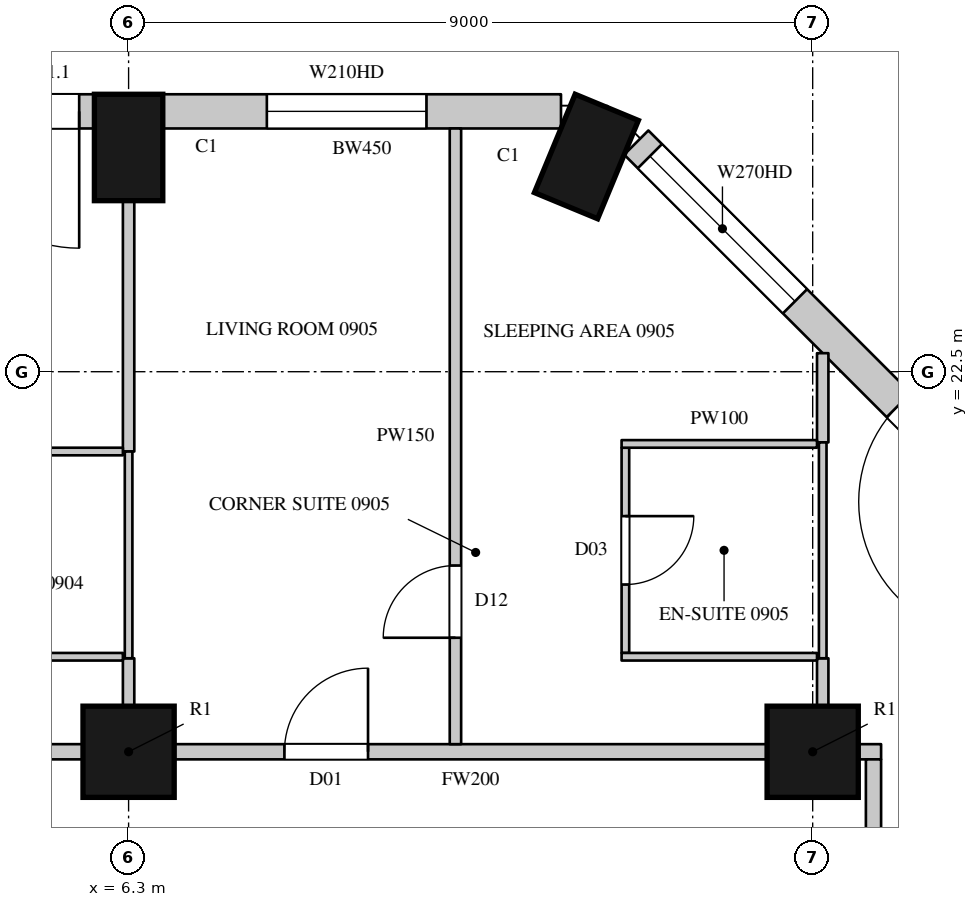
"""IFC4 building model, lengths in metres.
Left out: names, types, materials, properties, quantities, classifications, styles, units other than length and angle.
Written with IfcOpenShell. Run it as: python <this file> out.ifc"""

import sys

from ifc_helpers import new_model, si_unit, direction, frame, frame_2d, origin, origin_2d, place, context, subcontext, project, spatial, rectangle, circle, extrude, element, fill, save


model = new_model("IFC4")
c1 = context("Model", 3, precision=1e-05, world=origin(), true_north=direction((0.0, 1.0)))
c2 = subcontext(c1, "Body", "Model", "MODEL_VIEW")
j1 = project(units=[si_unit("LENGTHUNIT", "METRE"), si_unit("PLANEANGLEUNIT", "RADIAN")], contexts=[c1])
p1 = place(None, origin())
s1 = spatial("IfcSite", under=j1, at=p1, CompositionType="ELEMENT")
p2 = place(p1, origin())
s2 = spatial("IfcBuilding", under=s1, at=p2, CompositionType="ELEMENT")
p3 = place(p2, frame((0.0, 0.0, 62.7)))
s3 = spatial("IfcBuildingStorey", under=s2, at=p3, CompositionType="ELEMENT", Elevation=62.7)
for number, where, z_axis, x_axis in (
    (1, (12.323, 25.331, 0.0), (0.0, 0.0, 1.0), (-0.924, 0.383, 0.0)),
    (2, (6.3, 25.45, 0.0), (0.0, 0.0, 1.0), (-1.0, 0.0, 0.0)),
):
    element("IfcColumn", number, at=place(p3, frame(where, z_axis=z_axis, x_axis=x_axis)), inside=s3, PredefinedType="COLUMN", context=c2, shape_type="SweptSolid", body=[
        extrude(rectangle(XDim=0.9, YDim=1.4, at=origin_2d()), origin(), (0.0, 0.0, 1.0), 3.6),
    ])
for number, where, z_axis, x_axis in (
    (3, (6.3, 17.5, 0.0), (0.0, 0.0, 1.0), (1.0, 0.0, 0.0)),
    (4, (15.3, 17.5, 0.0), (0.0, 0.0, 1.0), (1.0, 0.0, 0.0)),
):
    element("IfcColumn", number, at=place(p3, frame(where, z_axis=z_axis, x_axis=x_axis)), inside=s3, PredefinedType="COLUMN", context=c2, shape_type="SweptSolid", body=[
        extrude(circle(Radius=0.6, at=origin_2d()), origin(), (0.0, 0.0, 1.0), 3.6),
    ])
p4 = place(p3, frame((18.229, 20.265, 0.0), z_axis=(0.0, 0.0, 1.0), x_axis=(-0.707106781187, 0.707106781187, 0.0)))
e5 = element("IfcWall", 5, at=p4, inside=s3, PredefinedType="SOLIDWALL", context=c2, shape_type="SweptSolid", body=[
    extrude(rectangle(XDim=7.424, YDim=0.45, at=frame_2d((3.712, 0.0))), origin(), (0.0, 0.0, 1.0), 3.3),
])
p5 = place(p4, frame((0.74, 0.0, 0.0)))
e6 = element("IfcOpeningElement", 6, at=p5, cuts=e5, PredefinedType="OPENING", context=c2, shape_type="SweptSolid", body=[
    extrude(rectangle(XDim=1.8, YDim=2.4, at=frame_2d((0.9, 1.2))), frame((0.0, 0.235, 0.0), z_axis=(0.0, -1.0, 0.0), x_axis=(1.0, 0.0, 0.0)), (0.0, 0.0, 1.0), 0.47),
])
p6 = place(p4, frame((4.471, 0.0, 1.05)))
e7 = element("IfcOpeningElement", 7, at=p6, cuts=e5, PredefinedType="OPENING", context=c2, shape_type="SweptSolid", body=[
    extrude(rectangle(XDim=2.7, YDim=2.0, at=frame_2d((1.35, 1.0))), frame((0.0, 0.235, 0.0), z_axis=(0.0, -1.0, 0.0), x_axis=(1.0, 0.0, 0.0)), (0.0, 0.0, 1.0), 0.47),
])
p7 = place(p3, frame((11.989, 25.925, 0.0), z_axis=(0.0, 0.0, 1.0), x_axis=(-1.0, 0.0, 0.0)))
e8 = element("IfcWall", 8, at=p7, inside=s3, PredefinedType="SOLIDWALL", context=c2, shape_type="SweptSolid", body=[
    extrude(rectangle(XDim=5.239, YDim=0.45, at=frame_2d((2.619, 0.0))), origin(), (0.0, 0.0, 1.0), 3.3),
])
p8 = place(p7, frame((1.77, 0.0, 1.05)))
e9 = element("IfcOpeningElement", 9, at=p8, cuts=e8, PredefinedType="OPENING", context=c2, shape_type="SweptSolid", body=[
    extrude(rectangle(XDim=2.1, YDim=2.0, at=frame_2d((1.05, 1.0))), frame((0.0, 0.235, 0.0), z_axis=(0.0, -1.0, 0.0), x_axis=(1.0, 0.0, 0.0)), (0.0, 0.0, 1.0), 0.47),
])
p9 = place(p3, frame((5.85, 25.925, 0.0), z_axis=(0.0, 0.0, 1.0), x_axis=(-1.0, 0.0, 0.0)))
e10 = element("IfcWall", 10, at=p9, inside=s3, PredefinedType="SOLIDWALL", context=c2, shape_type="SweptSolid", body=[
    extrude(rectangle(XDim=8.1, YDim=0.45, at=frame_2d((4.05, 0.0))), origin(), (0.0, 0.0, 1.0), 3.3),
])
p10 = place(p9, frame((0.2, 0.0, 0.0)))
e11 = element("IfcOpeningElement", 11, at=p10, cuts=e10, PredefinedType="OPENING", context=c2, shape_type="SweptSolid", body=[
    extrude(rectangle(XDim=1.8, YDim=2.4, at=frame_2d((0.9, 1.2))), frame((0.0, 0.235, 0.0), z_axis=(0.0, -1.0, 0.0), x_axis=(1.0, 0.0, 0.0)), (0.0, 0.0, 1.0), 0.47),
])
p11 = place(p9, frame((2.2, 0.0, 1.05)))
e12 = element("IfcOpeningElement", 12, at=p11, cuts=e10, PredefinedType="OPENING", context=c2, shape_type="SweptSolid", body=[
    extrude(rectangle(XDim=1.2, YDim=2.0, at=frame_2d((0.6, 1.0))), frame((0.0, 0.235, 0.0), z_axis=(0.0, -1.0, 0.0), x_axis=(1.0, 0.0, 0.0)), (0.0, 0.0, 1.0), 0.47),
])
p12 = place(p9, frame((4.7, 0.0, 0.0)))
e13 = element("IfcOpeningElement", 13, at=p12, cuts=e10, PredefinedType="OPENING", context=c2, shape_type="SweptSolid", body=[
    extrude(rectangle(XDim=1.8, YDim=2.4, at=frame_2d((0.9, 1.2))), frame((0.0, 0.235, 0.0), z_axis=(0.0, -1.0, 0.0), x_axis=(1.0, 0.0, 0.0)), (0.0, 0.0, 1.0), 0.47),
])
p13 = place(p9, frame((6.7, 0.0, 1.05)))
e14 = element("IfcOpeningElement", 14, at=p13, cuts=e10, PredefinedType="OPENING", context=c2, shape_type="SweptSolid", body=[
    extrude(rectangle(XDim=1.2, YDim=2.0, at=frame_2d((0.6, 1.0))), frame((0.0, 0.235, 0.0), z_axis=(0.0, -1.0, 0.0), x_axis=(1.0, 0.0, 0.0)), (0.0, 0.0, 1.0), 0.47),
])
p14 = place(p3, frame((16.486, 23.529, 0.0), z_axis=(0.0, 0.0, 1.0), x_axis=(-0.707022305137, 0.707191247145, 0.0)))
e15 = element("IfcWall", 15, at=p14, inside=s3, PredefinedType="SOLIDWALL", context=c2, shape_type="SweptSolid", body=[
    extrude(rectangle(XDim=1.445, YDim=0.45, at=frame_2d((0.723, 0.0))), origin(), (0.0, 0.0, 1.0), 0.6),
])
p15 = place(p3, frame((-2.1, 17.5, 0.0), z_axis=(0.0, 0.0, 1.0), x_axis=(1.0, 0.0, 0.0)))
e16 = element("IfcWall", 16, at=p15, inside=s3, PredefinedType="PARTITIONING", context=c2, shape_type="SweptSolid", body=[
    extrude(rectangle(XDim=7.8, YDim=0.2, at=frame_2d((3.9, 0.0))), origin(), (0.0, 0.0, 1.0), 2.75),
])
p16 = place(p15, frame((4.2, 0.0, 0.0)))
e17 = element("IfcOpeningElement", 17, at=p16, cuts=e16, PredefinedType="OPENING", context=c2, shape_type="SweptSolid", body=[
    extrude(rectangle(XDim=0.95, YDim=2.2, at=frame_2d((0.475, 1.1))), frame((0.0, 0.11, 0.0), z_axis=(0.0, -1.0, 0.0), x_axis=(1.0, 0.0, 0.0)), (0.0, 0.0, 1.0), 0.22),
])
p17 = place(p3, frame((6.9, 17.5, 0.0), z_axis=(0.0, 0.0, 1.0), x_axis=(1.0, 0.0, 0.0)))
e18 = element("IfcWall", 18, at=p17, inside=s3, PredefinedType="PARTITIONING", context=c2, shape_type="SweptSolid", body=[
    extrude(rectangle(XDim=7.8, YDim=0.2, at=frame_2d((3.9, 0.0))), origin(), (0.0, 0.0, 1.0), 2.75),
])
p18 = place(p17, frame((1.45, 0.0, 0.0)))
e19 = element("IfcOpeningElement", 19, at=p18, cuts=e18, PredefinedType="OPENING", context=c2, shape_type="SweptSolid", body=[
    extrude(rectangle(XDim=1.1, YDim=2.4, at=frame_2d((0.55, 1.2))), frame((0.0, 0.11, 0.0), z_axis=(0.0, -1.0, 0.0), x_axis=(1.0, 0.0, 0.0)), (0.0, 0.0, 1.0), 0.22),
])
p19 = place(p3, frame((15.9, 17.5, 0.0), z_axis=(0.0, 0.0, 1.0), x_axis=(1.0, 0.0, 0.0)))
e20 = element("IfcWall", 20, at=p19, inside=s3, PredefinedType="PARTITIONING", context=c2, shape_type="SweptSolid", body=[
    extrude(rectangle(XDim=0.3, YDim=0.2, at=frame_2d((0.15, 0.0))), origin(), (0.0, 0.0, 1.0), 3.3),
])
p20 = place(p3, frame((16.1, 4.75, 0.0), z_axis=(0.0, 0.0, 1.0), x_axis=(0.0, 1.0, 0.0)))
e21 = element("IfcWall", 21, at=p20, inside=s3, PredefinedType="PARTITIONING", context=c2, shape_type="SweptSolid", body=[
    extrude(rectangle(XDim=12.65, YDim=0.2, at=frame_2d((6.325, 0.0))), origin(), (0.0, 0.0, 1.0), 3.3),
])
p21 = place(p20, frame((0.25, 0.0, 0.0)))
e22 = element("IfcOpeningElement", 22, at=p21, cuts=e21, PredefinedType="OPENING", context=c2, shape_type="SweptSolid", body=[
    extrude(rectangle(XDim=0.95, YDim=2.2, at=frame_2d((0.475, 1.1))), frame((0.0, 0.11, 0.0), z_axis=(0.0, -1.0, 0.0), x_axis=(1.0, 0.0, 0.0)), (0.0, 0.0, 1.0), 0.22),
])
p22 = place(p20, frame((6.9, 0.0, 0.0)))
e23 = element("IfcOpeningElement", 23, at=p22, cuts=e21, PredefinedType="OPENING", context=c2, shape_type="SweptSolid", body=[
    extrude(rectangle(XDim=0.95, YDim=2.2, at=frame_2d((0.475, 1.1))), frame((0.0, 0.11, 0.0), z_axis=(0.0, -1.0, 0.0), x_axis=(1.0, 0.0, 0.0)), (0.0, 0.0, 1.0), 0.22),
])
p23 = place(p3, frame((6.3, 18.1, 0.0), z_axis=(0.0, 0.0, 1.0), x_axis=(0.0, 1.0, 0.0)))
e24 = element("IfcWall", 24, at=p23, inside=s3, PredefinedType="PARTITIONING", context=c2, shape_type="SweptSolid", body=[
    extrude(rectangle(XDim=0.63, YDim=0.15, at=frame_2d((0.315, 0.0))), origin(), (0.0, 0.0, 1.0), 2.75),
])
p24 = place(p3, frame((6.3, 21.45, 0.0), z_axis=(0.0, 0.0, 1.0), x_axis=(0.0, 1.0, 0.0)))
e25 = element("IfcWall", 25, at=p24, inside=s3, PredefinedType="PARTITIONING", context=c2, shape_type="SweptSolid", body=[
    extrude(rectangle(XDim=3.3, YDim=0.15, at=frame_2d((1.65, 0.0))), origin(), (0.0, 0.0, 1.0), 2.75),
])
p25 = place(p3, frame((10.6, 17.6, 0.0), z_axis=(0.0, 0.0, 1.0), x_axis=(0.0, 1.0, 0.0)))
e26 = element("IfcWall", 26, at=p25, inside=s3, PredefinedType="PARTITIONING", context=c2, shape_type="SweptSolid", body=[
    extrude(rectangle(XDim=8.1, YDim=0.15, at=frame_2d((4.05, 0.0))), origin(), (0.0, 0.0, 1.0), 3.3),
])
p26 = place(p25, frame((1.4, 0.0, 0.0)))
e27 = element("IfcOpeningElement", 27, at=p26, cuts=e26, PredefinedType="OPENING", context=c2, shape_type="SweptSolid", body=[
    extrude(rectangle(XDim=0.95, YDim=2.2, at=frame_2d((0.475, 1.1))), frame((0.0, 0.085, 0.0), z_axis=(0.0, -1.0, 0.0), x_axis=(1.0, 0.0, 0.0)), (0.0, 0.0, 1.0), 0.17),
])
p27 = place(p3, frame((15.432, 18.094, 0.0), z_axis=(0.0, 0.0, 1.0), x_axis=(0.0, 1.0, 0.0)))
e28 = element("IfcWall", 28, at=p27, inside=s3, PredefinedType="PARTITIONING", context=c2, shape_type="SweptSolid", body=[
    extrude(rectangle(XDim=0.636, YDim=0.15, at=frame_2d((0.318, 0.0))), origin(), (0.0, 0.0, 1.0), 3.3),
])
p28 = place(p3, frame((15.432, 21.57, 0.0), z_axis=(0.0, 0.0, 1.0), x_axis=(0.0, 1.0, 0.0)))
e29 = element("IfcWall", 29, at=p28, inside=s3, PredefinedType="PARTITIONING", context=c2, shape_type="SweptSolid", body=[
    extrude(rectangle(XDim=1.174, YDim=0.15, at=frame_2d((0.587, 0.0))), origin(), (0.0, 0.0, 1.0), 3.3),
])
for number, where, z_axis, x_axis in (
    (30, (3.354, 18.75, 0.0), (0.0, 0.0, 1.0), (1.0, 0.0, 0.0)),
    (31, (3.354, 21.45, 0.0), (0.0, 0.0, 1.0), (1.0, 0.0, 0.0)),
):
    element("IfcWall", number, at=place(p3, frame(where, z_axis=z_axis, x_axis=x_axis)), inside=s3, PredefinedType="PARTITIONING", context=c2, shape_type="SweptSolid", body=[
        extrude(rectangle(XDim=2.871, YDim=0.1, at=frame_2d((1.436, 0.0))), origin(), (0.0, 0.0, 1.0), 3.3),
    ])
p29 = place(p3, frame((6.3, 18.73, 0.0), z_axis=(0.0, 0.0, 1.0), x_axis=(0.0, 1.0, 0.0)))
e32 = element("IfcWall", 32, at=p29, inside=s3, PredefinedType="PARTITIONING", context=c2, shape_type="SweptSolid", body=[
    extrude(rectangle(XDim=2.72, YDim=0.1, at=frame_2d((1.36, 0.0))), origin(), (0.0, 0.0, 1.0), 2.75),
])
p30 = place(p3, frame((12.836, 18.8, 0.0), z_axis=(0.0, 0.0, 1.0), x_axis=(0.0, 1.0, 0.0)))
e33 = element("IfcWall", 33, at=p30, inside=s3, PredefinedType="PARTITIONING", context=c2, shape_type="SweptSolid", body=[
    extrude(rectangle(XDim=2.7, YDim=0.1, at=frame_2d((1.35, 0.0))), origin(), (0.0, 0.0, 1.0), 3.3),
])
p31 = place(p30, frame((0.9, 0.0, 0.0)))
e34 = element("IfcOpeningElement", 34, at=p31, cuts=e33, PredefinedType="OPENING", context=c2, shape_type="SweptSolid", body=[
    extrude(rectangle(XDim=0.9, YDim=2.2, at=frame_2d((0.45, 1.1))), frame((0.0, 0.06, 0.0), z_axis=(0.0, -1.0, 0.0), x_axis=(1.0, 0.0, 0.0)), (0.0, 0.0, 1.0), 0.12),
])
for number, where, z_axis, x_axis in (
    (35, (12.786, 18.75, 0.0), (0.0, 0.0, 1.0), (1.0, 0.0, 0.0)),
    (36, (12.786, 21.55, 0.0), (0.0, 0.0, 1.0), (1.0, 0.0, 0.0)),
):
    element("IfcWall", number, at=place(p3, frame(where, z_axis=z_axis, x_axis=x_axis)), inside=s3, PredefinedType="PARTITIONING", context=c2, shape_type="SweptSolid", body=[
        extrude(rectangle(XDim=2.571, YDim=0.1, at=frame_2d((1.286, 0.0))), origin(), (0.0, 0.0, 1.0), 3.3),
    ])
p32 = place(p3, frame((15.432, 18.73, 0.0), z_axis=(0.0, 0.0, 1.0), x_axis=(0.0, 1.0, 0.0)))
e37 = element("IfcWall", 37, at=p32, inside=s3, PredefinedType="PARTITIONING", context=c2, shape_type="SweptSolid", body=[
    extrude(rectangle(XDim=2.84, YDim=0.1, at=frame_2d((1.42, 0.0))), origin(), (0.0, 0.0, 1.0), 3.3),
])
p33 = place(p5, origin())
e38 = element("IfcDoor", 38, at=p33, inside=s3, OperationType="SLIDING_TO_LEFT", PredefinedType="DOOR", context=c2, shape_type="SweptSolid", body=[
    extrude(rectangle(XDim=1.8, YDim=2.4, at=frame_2d((0.9, 1.2))), frame((0.0, 0.13, 0.0), z_axis=(0.0, -1.0, 0.0), x_axis=(1.0, 0.0, 0.0)), (0.0, 0.0, 1.0), 0.05),
])
fill(e6, e38)
p34 = place(p6, origin())
e39 = element("IfcWindow", 39, at=p34, inside=s3, PartitioningType="SINGLE_PANEL", PredefinedType="WINDOW", context=c2, shape_type="SweptSolid", body=[
    extrude(rectangle(XDim=2.7, YDim=2.0, at=frame_2d((1.35, 1.0))), frame((0.0, 0.135, 0.0), z_axis=(0.0, -1.0, 0.0), x_axis=(1.0, 0.0, 0.0)), (0.0, 0.0, 1.0), 0.06),
])
fill(e7, e39)
p35 = place(p10, origin())
e40 = element("IfcDoor", 40, at=p35, inside=s3, OperationType="SLIDING_TO_LEFT", PredefinedType="DOOR", context=c2, shape_type="SweptSolid", body=[
    extrude(rectangle(XDim=1.8, YDim=2.4, at=frame_2d((0.9, 1.2))), frame((0.0, 0.13, 0.0), z_axis=(0.0, -1.0, 0.0), x_axis=(1.0, 0.0, 0.0)), (0.0, 0.0, 1.0), 0.05),
])
fill(e11, e40)
p36 = place(p18, origin())
e41 = element("IfcDoor", 41, at=p36, inside=s3, OperationType="SINGLE_SWING_RIGHT", PredefinedType="DOOR", context=c2, shape_type="SweptSolid", body=[
    extrude(rectangle(XDim=1.1, YDim=2.4, at=frame_2d((0.55, 1.2))), frame((0.0, 0.025, 0.0), z_axis=(0.0, -1.0, 0.0), x_axis=(1.0, 0.0, 0.0)), (0.0, 0.0, 1.0), 0.05),
])
fill(e19, e41)
p37 = place(p26, origin())
e42 = element("IfcDoor", 42, at=p37, inside=s3, OperationType="SINGLE_SWING_LEFT", PredefinedType="DOOR", context=c2, shape_type="SweptSolid", body=[
    extrude(rectangle(XDim=0.95, YDim=2.2, at=frame_2d((0.475, 1.1))), frame((0.0, 0.025, 0.0), z_axis=(0.0, -1.0, 0.0), x_axis=(1.0, 0.0, 0.0)), (0.0, 0.0, 1.0), 0.05),
])
fill(e27, e42)
p38 = place(p31, origin())
e43 = element("IfcDoor", 43, at=p38, inside=s3, OperationType="SINGLE_SWING_LEFT", PredefinedType="DOOR", context=c2, shape_type="SweptSolid", body=[
    extrude(rectangle(XDim=0.9, YDim=2.2, at=frame_2d((0.45, 1.1))), frame((0.0, 0.025, 0.0), z_axis=(0.0, -1.0, 0.0), x_axis=(1.0, 0.0, 0.0)), (0.0, 0.0, 1.0), 0.05),
])
fill(e34, e43)
p39 = place(p8, origin())
e44 = element("IfcWindow", 44, at=p39, inside=s3, PartitioningType="SINGLE_PANEL", PredefinedType="WINDOW", context=c2, shape_type="SweptSolid", body=[
    extrude(rectangle(XDim=2.1, YDim=2.0, at=frame_2d((1.05, 1.0))), frame((0.0, 0.135, 0.0), z_axis=(0.0, -1.0, 0.0), x_axis=(1.0, 0.0, 0.0)), (0.0, 0.0, 1.0), 0.06),
])
fill(e9, e44)
save(model, sys.argv[1])
